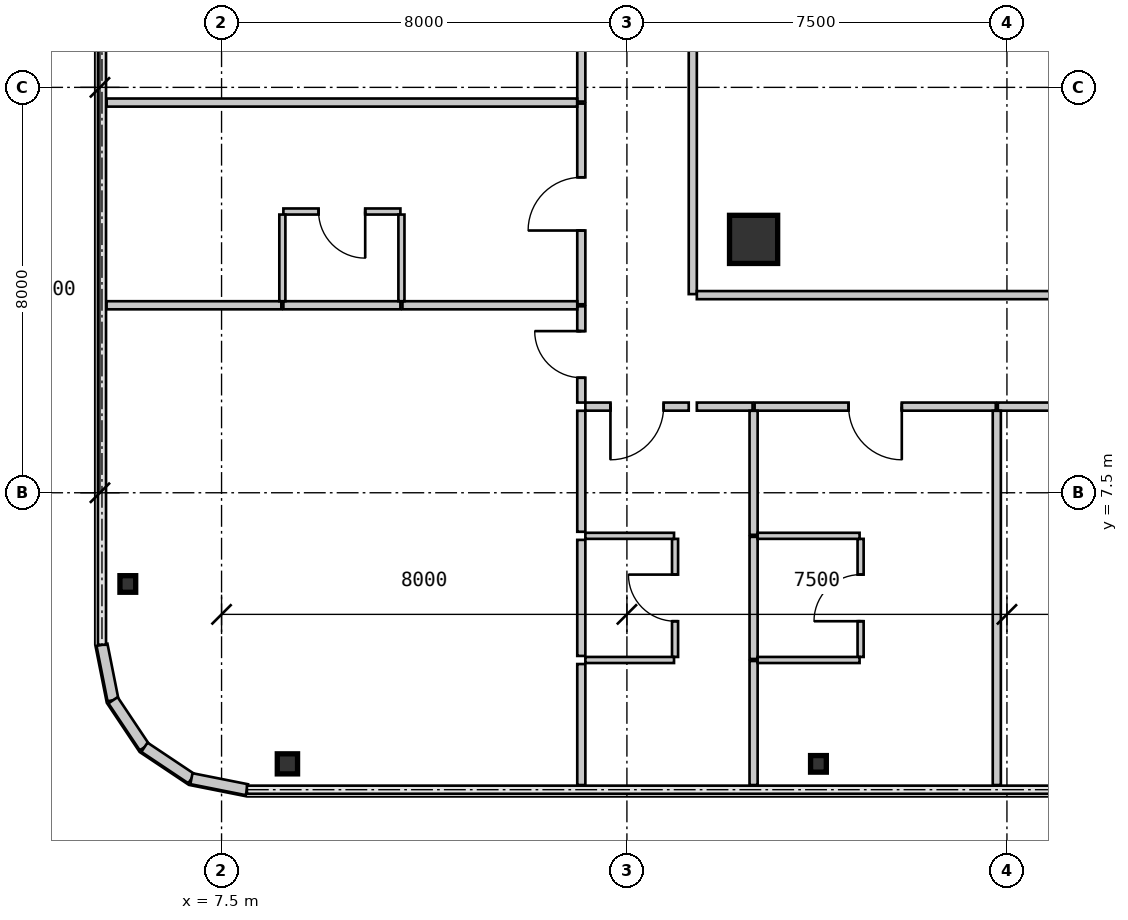
"""IFC4 building model, lengths in metres.
Left out: names, types, materials, properties, quantities, classifications, styles, units other than length and angle.
Written with IfcOpenShell. Run it as: python <this file> out.ifc"""

import sys

from ifc_helpers import new_model, si_unit, direction, frame, frame_2d, origin, origin_2d, place, context, subcontext, project, spatial, rectangle, i_section, extrude, source, transform, mapped, element, fill, save


model = new_model("IFC4")
c1 = context("Model", 3, precision=1e-05, world=origin(), true_north=direction((0.0, 1.0)))
c2 = subcontext(c1, "Body", "Model", "MODEL_VIEW")
j1 = project(units=[si_unit("LENGTHUNIT", "METRE"), si_unit("PLANEANGLEUNIT", "RADIAN")], contexts=[c1])
p1 = place(None, origin())
s1 = spatial("IfcSite", under=j1, at=p1, CompositionType="ELEMENT")
p2 = place(p1, origin())
s2 = spatial("IfcBuilding", under=s1, at=p2, CompositionType="ELEMENT")
p3 = place(p2, frame((0.0, 0.0, 19.95)))
s3 = spatial("IfcBuildingStorey", under=s2, at=p3, CompositionType="ELEMENT", Elevation=19.95)
m1 = source(origin(), c2, "Body", "SweptSolid", [
    extrude(rectangle(XDim=0.95, YDim=0.95, at=origin_2d()), origin(), (0.0, 0.0, 1.0), 3.15),
])
p4 = place(p3, frame((18.0, 12.5, 0.0), z_axis=(0.0, 0.0, 1.0), x_axis=(1.0, 0.0, 0.0)))
e1 = element("IfcColumn", 1, at=p4, inside=s3, PredefinedType="COLUMN", context=c2, shape_type="MappedRepresentation", body=[
    mapped(m1, transform((0.0, 0.0, 0.0), scale=1.0)),
])
m2 = source(origin(), c2, "Body", "SweptSolid", [
    extrude(i_section(OverallWidth=0.4, OverallDepth=0.396, WebThickness=0.022, FlangeThickness=0.034, at=origin_2d()), origin(), (0.0, 0.0, 1.0), 3.15),
])
p5 = place(p3, frame((8.8, 2.15, 0.0), z_axis=(0.0, 0.0, 1.0), x_axis=(1.0, 0.0, 0.0)))
e2 = element("IfcColumn", 2, at=p5, inside=s3, PredefinedType="COLUMN", context=c2, shape_type="MappedRepresentation", body=[
    mapped(m2, transform((0.0, 0.0, 0.0), scale=1.0)),
])
m3 = source(origin(), c2, "Body", "SweptSolid", [
    extrude(i_section(OverallWidth=0.311, OverallDepth=0.327, WebThickness=0.016, FlangeThickness=0.025, at=origin_2d()), origin(), (0.0, 0.0, 1.0), 3.15),
])
for number, where, z_axis, x_axis in (
    (3, (19.28, 2.15, 0.0), (0.0, 0.0, 1.0), (1.0, 0.0, 0.0)),
    (4, (5.65, 5.7, 0.0), (0.0, 0.0, 1.0), (1.0, 0.0, 0.0)),
):
    element("IfcColumn", number, at=place(p3, frame(where, z_axis=z_axis, x_axis=x_axis)), inside=s3, PredefinedType="COLUMN", context=c2, shape_type="MappedRepresentation", body=[
        mapped(m3, transform((0.0, 0.0, 0.0), scale=1.0)),
    ])
m4 = source(origin(), c2, "Body", "SweptSolid", [
    extrude(rectangle(XDim=1.116, YDim=0.22, at=frame_2d((0.558, 0.0))), origin(), (0.0, 0.0, 1.0), 2.93),
])
for number, where, z_axis, x_axis in (
    (5, (5.14, 4.5, 0.0), (0.0, 0.0, 1.0), (0.195, -0.981, 0.0)),
    (6, (5.358, 3.406, 0.0), (0.0, 0.0, 1.0), (0.556, -0.831, 0.0)),
    (7, (5.978, 2.478, 0.0), (0.0, 0.0, 1.0), (0.831, -0.556, 0.0)),
    (8, (6.906, 1.858, 0.0), (0.0, 0.0, 1.0), (0.981, -0.195, 0.0)),
):
    element("IfcWall", number, at=place(p3, frame(where, z_axis=z_axis, x_axis=x_axis)), inside=s3, PredefinedType="SOLIDWALL", context=c2, shape_type="MappedRepresentation", body=[
        mapped(m4, transform((0.0, 0.0, 0.0), scale=1.0)),
    ])
m5 = source(origin(), c2, "Body", "SweptSolid", [
    extrude(rectangle(XDim=5.16, YDim=0.16, at=frame_2d((2.58, 0.0))), origin(), (0.0, 0.0, 1.0), 2.93),
])
p6 = place(p3, frame((16.8, 16.58, 0.0), z_axis=(0.0, 0.0, 1.0), x_axis=(0.0, -1.0, 0.0)))
e9 = element("IfcWall", 9, at=p6, inside=s3, PredefinedType="PARTITIONING", context=c2, shape_type="MappedRepresentation", body=[
    mapped(m5, transform((0.0, 0.0, 0.0), scale=1.0)),
])
m6 = source(origin(), c2, "Body", "SweptSolid", [
    extrude(rectangle(XDim=2.04, YDim=0.16, at=frame_2d((1.02, 0.0))), origin(), (0.0, 0.0, 1.0), 2.93),
])
p7 = place(p3, frame((16.72, 9.2, 0.0), z_axis=(0.0, 0.0, 1.0), x_axis=(-1.0, 0.0, 0.0)))
e10 = element("IfcWall", 10, at=p7, inside=s3, PredefinedType="PARTITIONING", context=c2, shape_type="MappedRepresentation", body=[
    mapped(m6, transform((0.0, 0.0, 0.0), scale=1.0)),
])
m7 = source(origin(), c2, "Body", "SweptSolid", [
    extrude(rectangle(XDim=1.05, YDim=2.1, at=frame_2d((0.525, 1.05))), frame((0.0, 0.09, 0.0), z_axis=(0.0, -1.0, 0.0), x_axis=(1.0, 0.0, 0.0)), (0.0, 0.0, 1.0), 0.18),
])
p8 = place(p7, frame((0.495, 0.0, 0.0)))
e11 = element("IfcOpeningElement", 11, at=p8, cuts=e10, PredefinedType="OPENING", context=c2, shape_type="MappedRepresentation", body=[
    mapped(m7, transform((0.0, 0.0, 0.0), scale=1.0)),
])
m8 = source(origin(), c2, "Body", "SweptSolid", [
    extrude(rectangle(XDim=1.9, YDim=0.16, at=frame_2d((0.95, 0.0))), origin(), (0.0, 0.0, 1.0), 2.93),
])
p9 = place(p3, frame((14.6, 9.28, 0.0), z_axis=(0.0, 0.0, 1.0), x_axis=(0.0, 1.0, 0.0)))
e12 = element("IfcWall", 12, at=p9, inside=s3, PredefinedType="PARTITIONING", context=c2, shape_type="MappedRepresentation", body=[
    mapped(m8, transform((0.0, 0.0, 0.0), scale=1.0)),
])
m9 = source(origin(), c2, "Body", "SweptSolid", [
    extrude(rectangle(XDim=0.92, YDim=2.1, at=frame_2d((0.46, 1.05))), frame((0.0, 0.09, 0.0), z_axis=(0.0, -1.0, 0.0), x_axis=(1.0, 0.0, 0.0)), (0.0, 0.0, 1.0), 0.18),
])
p10 = place(p9, frame((0.49, 0.0, 0.0)))
e13 = element("IfcOpeningElement", 13, at=p10, cuts=e12, PredefinedType="OPENING", context=c2, shape_type="MappedRepresentation", body=[
    mapped(m9, transform((0.0, 0.0, 0.0), scale=1.0)),
])
m10 = source(origin(), c2, "Body", "SweptSolid", [
    extrude(rectangle(XDim=3.959, YDim=0.16, at=frame_2d((1.98, 0.0))), origin(), (0.0, 0.0, 1.0), 2.93),
])
p11 = place(p3, frame((14.6, 11.22, 0.0), z_axis=(0.0, 0.0, 1.0), x_axis=(0.0, 1.0, 0.0)))
e14 = element("IfcWall", 14, at=p11, inside=s3, PredefinedType="PARTITIONING", context=c2, shape_type="MappedRepresentation", body=[
    mapped(m10, transform((0.0, 0.0, 0.0), scale=1.0)),
])
p12 = place(p11, frame((1.455, 0.0, 0.0)))
e15 = element("IfcOpeningElement", 15, at=p12, cuts=e14, PredefinedType="OPENING", context=c2, shape_type="MappedRepresentation", body=[
    mapped(m7, transform((0.0, 0.0, 0.0), scale=1.0)),
])
m11 = source(origin(), c2, "Body", "SweptSolid", [
    extrude(rectangle(XDim=4.16, YDim=0.16, at=frame_2d((2.08, 0.0))), origin(), (0.0, 0.0, 1.0), 2.93),
])
p13 = place(p3, frame((14.6, 15.22, 0.0), z_axis=(0.0, 0.0, 1.0), x_axis=(0.0, 1.0, 0.0)))
e16 = element("IfcWall", 16, at=p13, inside=s3, PredefinedType="PARTITIONING", context=c2, shape_type="MappedRepresentation", body=[
    mapped(m11, transform((0.0, 0.0, 0.0), scale=1.0)),
])
p14 = place(p13, frame((1.62, 0.0, 0.0)))
e17 = element("IfcOpeningElement", 17, at=p14, cuts=e16, PredefinedType="OPENING", context=c2, shape_type="MappedRepresentation", body=[
    mapped(m9, transform((0.0, 0.0, 0.0), scale=1.0)),
])
m12 = source(origin(), c2, "Body", "SweptSolid", [
    extrude(rectangle(XDim=18.1, YDim=0.16, at=frame_2d((9.05, 0.0))), origin(), (0.0, 0.0, 1.0), 2.93),
])
p15 = place(p3, frame((16.88, 11.4, 0.0), z_axis=(0.0, 0.0, 1.0), x_axis=(1.0, 0.0, 0.0)))
e18 = element("IfcWall", 18, at=p15, inside=s3, PredefinedType="PARTITIONING", context=c2, shape_type="MappedRepresentation", body=[
    mapped(m12, transform((0.0, 0.0, 0.0), scale=1.0)),
])
p16 = place(p15, frame((8.525, 0.0, 0.0)))
e19 = element("IfcOpeningElement", 19, at=p16, cuts=e18, PredefinedType="OPENING", context=c2, shape_type="MappedRepresentation", body=[
    mapped(m7, transform((0.0, 0.0, 0.0), scale=1.0)),
])
m13 = source(origin(), c2, "Body", "SweptSolid", [
    extrude(rectangle(XDim=1.1, YDim=0.16, at=frame_2d((0.55, 0.0))), origin(), (0.0, 0.0, 1.0), 2.93),
])
p17 = place(p3, frame((17.98, 9.2, 0.0), z_axis=(0.0, 0.0, 1.0), x_axis=(-1.0, 0.0, 0.0)))
e20 = element("IfcWall", 20, at=p17, inside=s3, PredefinedType="PARTITIONING", context=c2, shape_type="MappedRepresentation", body=[
    mapped(m13, transform((0.0, 0.0, 0.0), scale=1.0)),
])
m14 = source(origin(), c2, "Body", "SweptSolid", [
    extrude(rectangle(XDim=4.76, YDim=0.16, at=frame_2d((2.38, 0.0))), origin(), (0.0, 0.0, 1.0), 2.93),
])
p18 = place(p3, frame((22.78, 9.2, 0.0), z_axis=(0.0, 0.0, 1.0), x_axis=(-1.0, 0.0, 0.0)))
e21 = element("IfcWall", 21, at=p18, inside=s3, PredefinedType="PARTITIONING", context=c2, shape_type="MappedRepresentation", body=[
    mapped(m14, transform((0.0, 0.0, 0.0), scale=1.0)),
])
p19 = place(p18, frame((1.855, 0.0, 0.0)))
e22 = element("IfcOpeningElement", 22, at=p19, cuts=e21, PredefinedType="OPENING", context=c2, shape_type="MappedRepresentation", body=[
    mapped(m7, transform((0.0, 0.0, 0.0), scale=1.0)),
])
m15 = source(origin(), c2, "Body", "SweptSolid", [
    extrude(rectangle(XDim=5.159, YDim=0.16, at=frame_2d((2.58, 0.0))), origin(), (0.0, 0.0, 1.0), 2.93),
])
p20 = place(p3, frame((27.98, 9.2, 0.0), z_axis=(0.0, 0.0, 1.0), x_axis=(-1.0, 0.0, 0.0)))
e23 = element("IfcWall", 23, at=p20, inside=s3, PredefinedType="PARTITIONING", context=c2, shape_type="MappedRepresentation", body=[
    mapped(m15, transform((0.0, 0.0, 0.0), scale=1.0)),
])
p21 = place(p20, frame((2.12, 0.0, 0.0)))
e24 = element("IfcOpeningElement", 24, at=p21, cuts=e23, PredefinedType="OPENING", context=c2, shape_type="MappedRepresentation", body=[
    mapped(m9, transform((0.0, 0.0, 0.0), scale=1.0)),
])
m16 = source(origin(), c2, "Body", "SweptSolid", [
    extrude(rectangle(XDim=2.33, YDim=0.12, at=frame_2d((1.165, 0.0))), origin(), (0.0, 0.0, 1.0), 2.93),
])
p22 = place(p3, frame((16.45, 4.26, 0.0), z_axis=(0.0, 0.0, 1.0), x_axis=(0.0, 1.0, 0.0)))
e25 = element("IfcWall", 25, at=p22, inside=s3, PredefinedType="PARTITIONING", context=c2, shape_type="MappedRepresentation", body=[
    mapped(m16, transform((0.0, 0.0, 0.0), scale=1.0)),
])
m17 = source(origin(), c2, "Body", "SweptSolid", [
    extrude(rectangle(XDim=0.92, YDim=2.1, at=frame_2d((0.46, 1.05))), frame((0.0, 0.07, 0.0), z_axis=(0.0, -1.0, 0.0), x_axis=(1.0, 0.0, 0.0)), (0.0, 0.0, 1.0), 0.14),
])
p23 = place(p22, frame((0.705, 0.0, 0.0)))
e26 = element("IfcOpeningElement", 26, at=p23, cuts=e25, PredefinedType="OPENING", context=c2, shape_type="MappedRepresentation", body=[
    mapped(m17, transform((0.0, 0.0, 0.0), scale=1.0)),
])
m18 = source(origin(), c2, "Body", "SweptSolid", [
    extrude(rectangle(XDim=1.75, YDim=0.12, at=frame_2d((0.875, 0.0))), origin(), (0.0, 0.0, 1.0), 2.93),
])
for number, where, z_axis, x_axis in (
    (27, (14.68, 4.2, 0.0), (0.0, 0.0, 1.0), (1.0, 0.0, 0.0)),
    (28, (16.43, 6.65, 0.0), (0.0, 0.0, 1.0), (-1.0, 0.0, 0.0)),
):
    element("IfcWall", number, at=place(p3, frame(where, z_axis=z_axis, x_axis=x_axis)), inside=s3, PredefinedType="PARTITIONING", context=c2, shape_type="MappedRepresentation", body=[
        mapped(m18, transform((0.0, 0.0, 0.0), scale=1.0)),
    ])
m19 = source(origin(), c2, "Body", "SweptSolid", [
    extrude(rectangle(XDim=2.448, YDim=0.16, at=frame_2d((1.224, 0.0))), origin(), (0.0, 0.0, 1.0), 2.93),
])
for number, where, z_axis, x_axis in (
    (29, (18.0, 4.18, 0.0), (0.0, 0.0, 1.0), (0.0, -1.0, 0.0)),
    (30, (18.0, 9.118, 0.0), (0.0, 0.0, 1.0), (0.0, -1.0, 0.0)),
):
    element("IfcWall", number, at=place(p3, frame(where, z_axis=z_axis, x_axis=x_axis)), inside=s3, PredefinedType="PARTITIONING", context=c2, shape_type="MappedRepresentation", body=[
        mapped(m19, transform((0.0, 0.0, 0.0), scale=1.0)),
    ])
m20 = source(origin(), c2, "Body", "SweptSolid", [
    extrude(rectangle(XDim=2.41, YDim=0.16, at=frame_2d((1.205, 0.0))), origin(), (0.0, 0.0, 1.0), 2.93),
])
p24 = place(p3, frame((18.0, 6.63, 0.0), z_axis=(0.0, 0.0, 1.0), x_axis=(0.0, -1.0, 0.0)))
e31 = element("IfcWall", 31, at=p24, inside=s3, PredefinedType="PARTITIONING", context=c2, shape_type="MappedRepresentation", body=[
    mapped(m20, transform((0.0, 0.0, 0.0), scale=1.0)),
])
m21 = source(origin(), c2, "Body", "SweptSolid", [
    extrude(rectangle(XDim=2.388, YDim=0.16, at=frame_2d((1.194, 0.0))), origin(), (0.0, 0.0, 1.0), 2.93),
])
p25 = place(p3, frame((14.6, 1.732, 0.0), z_axis=(0.0, 0.0, 1.0), x_axis=(0.0, 1.0, 0.0)))
e32 = element("IfcWall", 32, at=p25, inside=s3, PredefinedType="PARTITIONING", context=c2, shape_type="MappedRepresentation", body=[
    mapped(m21, transform((0.0, 0.0, 0.0), scale=1.0)),
])
m22 = source(origin(), c2, "Body", "SweptSolid", [
    extrude(rectangle(XDim=2.388, YDim=0.16, at=frame_2d((1.194, 0.0))), origin(), (0.0, 0.0, 1.0), 2.93),
])
p26 = place(p3, frame((14.6, 6.73, 0.0), z_axis=(0.0, 0.0, 1.0), x_axis=(0.0, 1.0, 0.0)))
e33 = element("IfcWall", 33, at=p26, inside=s3, PredefinedType="PARTITIONING", context=c2, shape_type="MappedRepresentation", body=[
    mapped(m22, transform((0.0, 0.0, 0.0), scale=1.0)),
])
m23 = source(origin(), c2, "Body", "SweptSolid", [
    extrude(rectangle(XDim=2.29, YDim=0.16, at=frame_2d((1.145, 0.0))), origin(), (0.0, 0.0, 1.0), 2.93),
])
p27 = place(p3, frame((14.6, 4.28, 0.0), z_axis=(0.0, 0.0, 1.0), x_axis=(0.0, 1.0, 0.0)))
e34 = element("IfcWall", 34, at=p27, inside=s3, PredefinedType="PARTITIONING", context=c2, shape_type="MappedRepresentation", body=[
    mapped(m23, transform((0.0, 0.0, 0.0), scale=1.0)),
])
p28 = place(p3, frame((20.112, 4.26, 0.0), z_axis=(0.0, 0.0, 1.0), x_axis=(0.0, 1.0, 0.0)))
e35 = element("IfcWall", 35, at=p28, inside=s3, PredefinedType="PARTITIONING", context=c2, shape_type="MappedRepresentation", body=[
    mapped(m16, transform((0.0, 0.0, 0.0), scale=1.0)),
])
p29 = place(p28, frame((0.705, 0.0, 0.0)))
e36 = element("IfcOpeningElement", 36, at=p29, cuts=e35, PredefinedType="OPENING", context=c2, shape_type="MappedRepresentation", body=[
    mapped(m17, transform((0.0, 0.0, 0.0), scale=1.0)),
])
m24 = source(origin(), c2, "Body", "SweptSolid", [
    extrude(rectangle(XDim=2.012, YDim=0.12, at=frame_2d((1.006, 0.0))), origin(), (0.0, 0.0, 1.0), 2.93),
])
for number, where, z_axis, x_axis in (
    (37, (18.08, 4.2, 0.0), (0.0, 0.0, 1.0), (1.0, 0.0, 0.0)),
    (38, (20.092, 6.65, 0.0), (0.0, 0.0, 1.0), (-1.0, 0.0, 0.0)),
):
    element("IfcWall", number, at=place(p3, frame(where, z_axis=z_axis, x_axis=x_axis)), inside=s3, PredefinedType="PARTITIONING", context=c2, shape_type="MappedRepresentation", body=[
        mapped(m24, transform((0.0, 0.0, 0.0), scale=1.0)),
    ])
m25 = source(origin(), c2, "Body", "SweptSolid", [
    extrude(rectangle(XDim=7.386, YDim=0.16, at=frame_2d((3.693, 0.0))), origin(), (0.0, 0.0, 1.0), 2.93),
])
p30 = place(p3, frame((22.8, 9.118, 0.0), z_axis=(0.0, 0.0, 1.0), x_axis=(0.0, -1.0, 0.0)))
e39 = element("IfcWall", 39, at=p30, inside=s3, PredefinedType="PARTITIONING", context=c2, shape_type="MappedRepresentation", body=[
    mapped(m25, transform((0.0, 0.0, 0.0), scale=1.0)),
])
m26 = source(origin(), c2, "Body", "SweptSolid", [
    extrude(rectangle(XDim=3.45, YDim=0.16, at=frame_2d((1.725, 0.0))), origin(), (0.0, 0.0, 1.0), 2.93),
])
for number, where, z_axis, x_axis in (
    (40, (5.23, 11.2, 0.0), (0.0, 0.0, 1.0), (1.0, 0.0, 0.0)),
    (41, (11.07, 11.2, 0.0), (0.0, 0.0, 1.0), (1.0, 0.0, 0.0)),
):
    element("IfcWall", number, at=place(p3, frame(where, z_axis=z_axis, x_axis=x_axis)), inside=s3, PredefinedType="PARTITIONING", context=c2, shape_type="MappedRepresentation", body=[
        mapped(m26, transform((0.0, 0.0, 0.0), scale=1.0)),
    ])
m27 = source(origin(), c2, "Body", "SweptSolid", [
    extrude(rectangle(XDim=2.31, YDim=0.16, at=frame_2d((1.155, 0.0))), origin(), (0.0, 0.0, 1.0), 2.93),
])
p31 = place(p3, frame((8.72, 11.2, 0.0), z_axis=(0.0, 0.0, 1.0), x_axis=(1.0, 0.0, 0.0)))
e42 = element("IfcWall", 42, at=p31, inside=s3, PredefinedType="PARTITIONING", context=c2, shape_type="MappedRepresentation", body=[
    mapped(m27, transform((0.0, 0.0, 0.0), scale=1.0)),
])
m28 = source(origin(), c2, "Body", "SweptSolid", [
    extrude(rectangle(XDim=2.31, YDim=0.12, at=frame_2d((1.155, 0.0))), origin(), (0.0, 0.0, 1.0), 2.93),
])
p32 = place(p3, frame((11.03, 13.05, 0.0), z_axis=(0.0, 0.0, 1.0), x_axis=(-1.0, 0.0, 0.0)))
e43 = element("IfcWall", 43, at=p32, inside=s3, PredefinedType="PARTITIONING", context=c2, shape_type="MappedRepresentation", body=[
    mapped(m28, transform((0.0, 0.0, 0.0), scale=1.0)),
])
p33 = place(p32, frame((0.695, 0.0, 0.0)))
e44 = element("IfcOpeningElement", 44, at=p33, cuts=e43, PredefinedType="OPENING", context=c2, shape_type="MappedRepresentation", body=[
    mapped(m17, transform((0.0, 0.0, 0.0), scale=1.0)),
])
m29 = source(origin(), c2, "Body", "SweptSolid", [
    extrude(rectangle(XDim=1.71, YDim=0.12, at=frame_2d((0.855, 0.0))), origin(), (0.0, 0.0, 1.0), 2.93),
])
for number, where, z_axis, x_axis in (
    (45, (8.7, 12.99, 0.0), (0.0, 0.0, 1.0), (0.0, -1.0, 0.0)),
    (46, (11.05, 11.28, 0.0), (0.0, 0.0, 1.0), (0.0, 1.0, 0.0)),
):
    element("IfcWall", number, at=place(p3, frame(where, z_axis=z_axis, x_axis=x_axis)), inside=s3, PredefinedType="PARTITIONING", context=c2, shape_type="MappedRepresentation", body=[
        mapped(m29, transform((0.0, 0.0, 0.0), scale=1.0)),
    ])
m30 = source(origin(), c2, "Body", "SweptSolid", [
    extrude(rectangle(XDim=9.286, YDim=0.16, at=frame_2d((4.643, 0.0))), origin(), (0.0, 0.0, 1.0), 2.93),
])
p34 = place(p3, frame((5.232, 15.2, 0.0), z_axis=(0.0, 0.0, 1.0), x_axis=(1.0, 0.0, 0.0)))
e47 = element("IfcWall", 47, at=p34, inside=s3, PredefinedType="PARTITIONING", context=c2, shape_type="MappedRepresentation", body=[
    mapped(m30, transform((0.0, 0.0, 0.0), scale=1.0)),
])
m31 = source(origin(), c2, "Body", "SweptSolid", [
    extrude(rectangle(XDim=1.05, YDim=2.1, at=frame_2d((0.525, 1.05))), frame((0.0, 0.025, 0.0), z_axis=(0.0, -1.0, 0.0), x_axis=(1.0, 0.0, 0.0)), (0.0, 0.0, 1.0), 0.05),
])
p35 = place(p8, origin())
e48 = element("IfcDoor", 48, at=p35, inside=s3, OperationType="SINGLE_SWING_RIGHT", PredefinedType="DOOR", context=c2, shape_type="MappedRepresentation", body=[
    mapped(m31, transform((0.0, 0.0, 0.0), scale=1.0)),
])
fill(e11, e48)
m32 = source(origin(), c2, "Body", "SweptSolid", [
    extrude(rectangle(XDim=0.92, YDim=2.1, at=frame_2d((0.46, 1.05))), frame((0.0, 0.025, 0.0), z_axis=(0.0, -1.0, 0.0), x_axis=(1.0, 0.0, 0.0)), (0.0, 0.0, 1.0), 0.05),
])
p36 = place(p10, origin())
e49 = element("IfcDoor", 49, at=p36, inside=s3, OperationType="SINGLE_SWING_RIGHT", PredefinedType="DOOR", context=c2, shape_type="MappedRepresentation", body=[
    mapped(m32, transform((0.0, 0.0, 0.0), scale=1.0)),
])
fill(e13, e49)
p37 = place(p12, origin())
e50 = element("IfcDoor", 50, at=p37, inside=s3, OperationType="SINGLE_SWING_LEFT", PredefinedType="DOOR", context=c2, shape_type="MappedRepresentation", body=[
    mapped(m31, transform((0.0, 0.0, 0.0), scale=1.0)),
])
fill(e15, e50)
p38 = place(p19, origin())
e51 = element("IfcDoor", 51, at=p38, inside=s3, OperationType="SINGLE_SWING_LEFT", PredefinedType="DOOR", context=c2, shape_type="MappedRepresentation", body=[
    mapped(m31, transform((0.0, 0.0, 0.0), scale=1.0)),
])
fill(e22, e51)
p39 = place(p23, origin())
e52 = element("IfcDoor", 52, at=p39, inside=s3, OperationType="SINGLE_SWING_RIGHT", PredefinedType="DOOR", context=c2, shape_type="MappedRepresentation", body=[
    mapped(m32, transform((0.0, 0.0, 0.0), scale=1.0)),
])
fill(e26, e52)
p40 = place(p29, origin())
e53 = element("IfcDoor", 53, at=p40, inside=s3, OperationType="SINGLE_SWING_LEFT", PredefinedType="DOOR", context=c2, shape_type="MappedRepresentation", body=[
    mapped(m32, transform((0.0, 0.0, 0.0), scale=1.0)),
])
fill(e36, e53)
p41 = place(p33, origin())
e54 = element("IfcDoor", 54, at=p41, inside=s3, OperationType="SINGLE_SWING_LEFT", PredefinedType="DOOR", context=c2, shape_type="MappedRepresentation", body=[
    mapped(m32, transform((0.0, 0.0, 0.0), scale=1.0)),
])
fill(e44, e54)
save(model, sys.argv[1])
